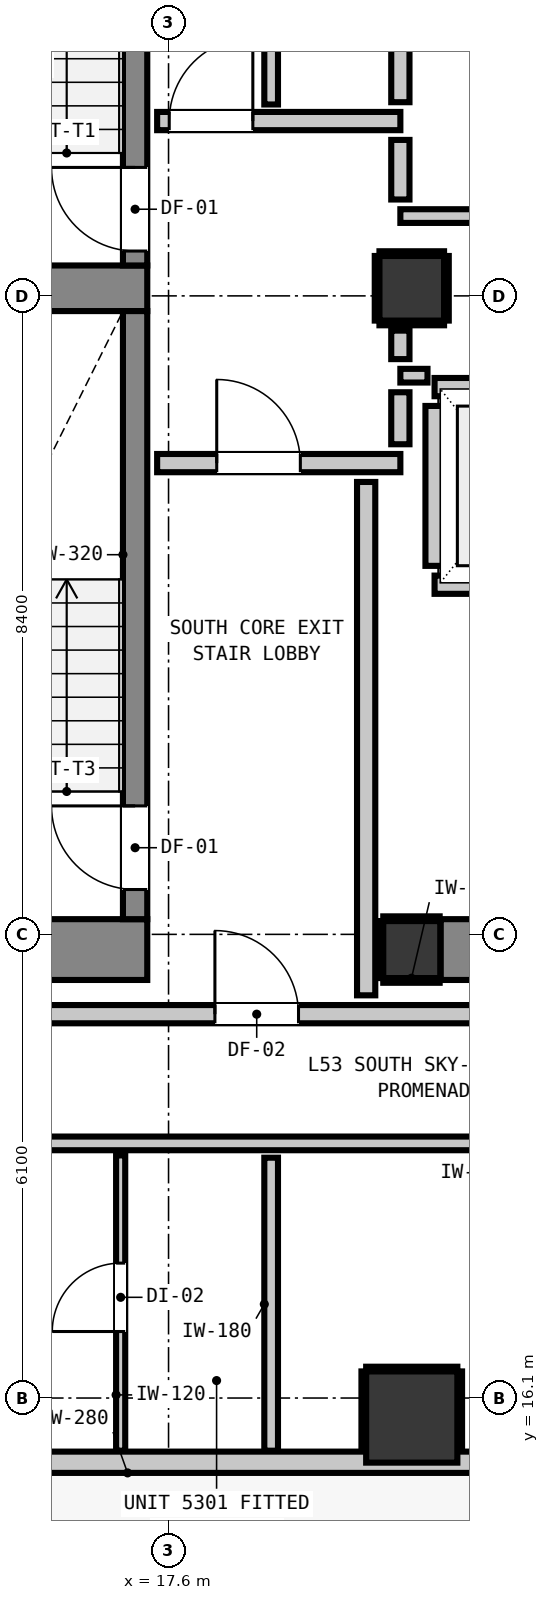
"""IFC4 building model, lengths in metres.
Left out: names, types, materials, properties, quantities, classifications, styles, units other than length and angle.
Written with IfcOpenShell. Run it as: python <this file> out.ifc"""

import sys

from ifc_helpers import new_model, si_unit, direction, frame, frame_2d, origin, origin_2d, place, context, subcontext, project, spatial, rectangle, extrude, element, fill, save


model = new_model("IFC4")
c1 = context("Model", 3, precision=1e-05, world=origin(), true_north=direction((0.0, 1.0)))
c2 = subcontext(c1, "Body", "Model", "MODEL_VIEW")
j1 = project(units=[si_unit("LENGTHUNIT", "METRE"), si_unit("PLANEANGLEUNIT", "RADIAN")], contexts=[c1])
p1 = place(None, origin())
s1 = spatial("IfcSite", under=j1, at=p1, CompositionType="ELEMENT")
p2 = place(p1, origin())
s2 = spatial("IfcBuilding", under=s1, at=p2, CompositionType="ELEMENT")
p3 = place(p2, frame((0.0, 0.0, 183.52)))
s3 = spatial("IfcBuildingStorey", under=s2, at=p3, CompositionType="ELEMENT", Elevation=183.52)
p4 = place(p3, frame((20.8, 22.0, 0.0), z_axis=(0.0, 0.0, 1.0), x_axis=(1.0, 0.0, 0.0)))
e1 = element("IfcColumn", 1, at=p4, inside=s3, PredefinedType="COLUMN", context=c2, shape_type="SweptSolid", body=[
    extrude(rectangle(XDim=0.75, YDim=0.75, at=origin_2d()), origin(), (0.0, 0.0, 1.0), 3.32),
])
p5 = place(p3, frame((13.24, 22.0, 0.0), z_axis=(0.0, 0.0, 1.0), x_axis=(1.0, 0.0, 0.0)))
e2 = element("IfcWall", 2, at=p5, inside=s3, PredefinedType="SHEAR", context=c2, shape_type="SweptSolid", body=[
    extrude(rectangle(XDim=4.08, YDim=0.8, at=frame_2d((2.04, 0.0))), origin(), (0.0, 0.0, 1.0), 3.32),
])
p6 = place(p3, frame((13.78, 30.7, 0.0), z_axis=(0.0, 0.0, 1.0), x_axis=(1.0, 0.0, 0.0)))
e3 = element("IfcWall", 3, at=p6, inside=s3, PredefinedType="SHEAR", context=c2, shape_type="SweptSolid", body=[
    extrude(rectangle(XDim=3.54, YDim=0.6, at=frame_2d((1.77, 0.0))), origin(), (0.0, 0.0, 1.0), 3.32),
])
p7 = place(p3, frame((21.18, 22.0, 0.0), z_axis=(0.0, 0.0, 1.0), x_axis=(1.0, 0.0, 0.0)))
e4 = element("IfcWall", 4, at=p7, inside=s3, PredefinedType="SHEAR", context=c2, shape_type="SweptSolid", body=[
    extrude(rectangle(XDim=7.64, YDim=0.8, at=frame_2d((3.82, 0.0))), origin(), (0.0, 0.0, 1.0), 3.32),
])
p8 = place(p3, frame((17.16, 31.0, 0.0), z_axis=(0.0, 0.0, 1.0), x_axis=(0.0, 1.0, 0.0)))
e5 = element("IfcWall", 5, at=p8, inside=s3, PredefinedType="SHEAR", context=c2, shape_type="SweptSolid", body=[
    extrude(rectangle(XDim=7.8, YDim=0.32, at=frame_2d((3.9, 0.0))), origin(), (0.0, 0.0, 1.0), 3.32),
])
p9 = place(p8, frame((0.19, 0.0, 0.0)))
e6 = element("IfcOpeningElement", 6, at=p9, cuts=e5, PredefinedType="OPENING", context=c2, shape_type="SweptSolid", body=[
    extrude(rectangle(XDim=1.1, YDim=2.15, at=frame_2d((0.55, 1.075))), frame((0.0, 0.17, 0.0), z_axis=(0.0, -1.0, 0.0), x_axis=(1.0, 0.0, 0.0)), (0.0, 0.0, 1.0), 0.34),
])
p10 = place(p3, frame((17.16, 22.4, 0.0), z_axis=(0.0, 0.0, 1.0), x_axis=(0.0, 1.0, 0.0)))
e7 = element("IfcWall", 7, at=p10, inside=s3, PredefinedType="SHEAR", context=c2, shape_type="SweptSolid", body=[
    extrude(rectangle(XDim=8.0, YDim=0.32, at=frame_2d((4.0, 0.0))), origin(), (0.0, 0.0, 1.0), 3.32),
])
p11 = place(p10, frame((0.39, 0.0, 0.0)))
e8 = element("IfcOpeningElement", 8, at=p11, cuts=e7, PredefinedType="OPENING", context=c2, shape_type="SweptSolid", body=[
    extrude(rectangle(XDim=1.1, YDim=2.15, at=frame_2d((0.55, 1.075))), frame((0.0, 0.17, 0.0), z_axis=(0.0, -1.0, 0.0), x_axis=(1.0, 0.0, 0.0)), (0.0, 0.0, 1.0), 0.34),
])
p12 = place(p3, frame((20.8, 30.7, 0.0), z_axis=(0.0, 0.0, 1.0), x_axis=(1.0, 0.0, 0.0)))
e9 = element("IfcColumn", 9, at=p12, inside=s3, PredefinedType="COLUMN", context=c2, shape_type="SweptSolid", body=[
    extrude(rectangle(XDim=0.85, YDim=0.85, at=origin_2d()), origin(), (0.0, 0.0, 1.0), 3.32),
])
p13 = place(p3, frame((20.8, 15.85, 0.0), z_axis=(0.0, 0.0, 1.0), x_axis=(1.0, 0.0, 0.0)))
e10 = element("IfcColumn", 10, at=p13, inside=s3, PredefinedType="COLUMN", context=c2, shape_type="SweptSolid", body=[
    extrude(rectangle(XDim=1.2, YDim=1.2, at=origin_2d()), origin(), (0.0, 0.0, 1.0), 3.32),
])
p14 = place(p3, frame((40.445, 15.255, 0.0), z_axis=(0.0, 0.0, 1.0), x_axis=(-1.0, 0.0, 0.0)))
e11 = element("IfcWall", 11, at=p14, inside=s3, PredefinedType="STANDARD", context=c2, shape_type="SweptSolid", body=[
    extrude(rectangle(XDim=35.09, YDim=0.28, at=frame_2d((17.545, 0.0))), origin(), (0.0, 0.0, 1.0), 3.08),
])
p15 = place(p14, frame((0.904, 0.0, 0.0)))
e12 = element("IfcOpeningElement", 12, at=p15, cuts=e11, PredefinedType="OPENING", context=c2, shape_type="SweptSolid", body=[
    extrude(rectangle(XDim=1.0, YDim=2.15, at=frame_2d((0.5, 1.075))), frame((0.0, 0.15, 0.0), z_axis=(0.0, -1.0, 0.0), x_axis=(1.0, 0.0, 0.0)), (0.0, 0.0, 1.0), 0.3),
])
p16 = place(p14, frame((30.798, 0.0, 0.85)))
e13 = element("IfcOpeningElement", 13, at=p16, cuts=e11, PredefinedType="OPENING", context=c2, shape_type="SweptSolid", body=[
    extrude(rectangle(XDim=1.05, YDim=1.65, at=frame_2d((0.525, 0.825))), frame((0.0, 0.15, 0.0), z_axis=(0.0, -1.0, 0.0), x_axis=(1.0, 0.0, 0.0)), (0.0, 0.0, 1.0), 0.3),
])
p17 = place(p14, frame((14.92, 0.0, 0.85)))
e14 = element("IfcOpeningElement", 14, at=p17, cuts=e11, PredefinedType="OPENING", context=c2, shape_type="SweptSolid", body=[
    extrude(rectangle(XDim=1.05, YDim=1.65, at=frame_2d((0.525, 0.825))), frame((0.0, 0.15, 0.0), z_axis=(0.0, -1.0, 0.0), x_axis=(1.0, 0.0, 0.0)), (0.0, 0.0, 1.0), 0.3),
])
for number, where, z_axis, x_axis in (
    (15, (21.1, 26.8, 0.0), (0.0, 0.0, 1.0), (1.0, 0.0, 0.0)),
    (16, (21.1, 29.4, 0.0), (0.0, 0.0, 1.0), (1.0, 0.0, 0.0)),
):
    element("IfcWall", number, at=place(p3, frame(where, z_axis=z_axis, x_axis=x_axis)), inside=s3, PredefinedType="PARTITIONING", context=c2, shape_type="SweptSolid", body=[
        extrude(rectangle(XDim=2.2, YDim=0.24, at=frame_2d((1.1, 0.0))), origin(), (0.0, 0.0, 1.0), 3.08),
    ])
p18 = place(p3, frame((21.1, 27.048, 0.0), z_axis=(0.0, 0.0, 1.0), x_axis=(0.0, 1.0, 0.0)))
e17 = element("IfcWall", 17, at=p18, inside=s3, PredefinedType="PARTITIONING", context=c2, shape_type="SweptSolid", body=[
    extrude(rectangle(XDim=2.104, YDim=0.24, at=frame_2d((1.052, 0.0))), origin(), (0.0, 0.0, 1.0), 2.315),
])
p19 = place(p3, frame((12.983, 21.15, 0.0), z_axis=(0.0, 0.0, 1.0), x_axis=(1.0, 0.0, 0.0)))
e18 = element("IfcWall", 18, at=p19, inside=s3, PredefinedType="PARTITIONING", context=c2, shape_type="SweptSolid", body=[
    extrude(rectangle(XDim=29.61, YDim=0.24, at=frame_2d((14.805, 0.0))), origin(), (0.0, 0.0, 1.0), 3.08),
])
p20 = place(p19, frame((5.227, 0.0, 0.0)))
e19 = element("IfcOpeningElement", 19, at=p20, cuts=e18, PredefinedType="OPENING", context=c2, shape_type="SweptSolid", body=[
    extrude(rectangle(XDim=1.1, YDim=2.15, at=frame_2d((0.55, 1.075))), frame((0.0, 0.13, 0.0), z_axis=(0.0, -1.0, 0.0), x_axis=(1.0, 0.0, 0.0)), (0.0, 0.0, 1.0), 0.26),
])
p21 = place(p19, frame((26.668, 0.0, 0.0)))
e20 = element("IfcOpeningElement", 20, at=p21, cuts=e18, PredefinedType="OPENING", context=c2, shape_type="SweptSolid", body=[
    extrude(rectangle(XDim=1.0, YDim=2.15, at=frame_2d((0.5, 1.075))), frame((0.0, 0.13, 0.0), z_axis=(0.0, -1.0, 0.0), x_axis=(1.0, 0.0, 0.0)), (0.0, 0.0, 1.0), 0.26),
])
p22 = place(p3, frame((17.45, 28.4, 0.0), z_axis=(0.0, 0.0, 1.0), x_axis=(1.0, 0.0, 0.0)))
e21 = element("IfcWall", 21, at=p22, inside=s3, PredefinedType="PARTITIONING", context=c2, shape_type="SweptSolid", body=[
    extrude(rectangle(XDim=3.2, YDim=0.24, at=frame_2d((1.6, 0.0))), origin(), (0.0, 0.0, 1.0), 3.08),
])
p23 = place(p22, frame((0.784, 0.0, 0.0)))
e22 = element("IfcOpeningElement", 22, at=p23, cuts=e21, PredefinedType="OPENING", context=c2, shape_type="SweptSolid", body=[
    extrude(rectangle(XDim=1.1, YDim=2.15, at=frame_2d((0.55, 1.075))), frame((0.0, 0.13, 0.0), z_axis=(0.0, -1.0, 0.0), x_axis=(1.0, 0.0, 0.0)), (0.0, 0.0, 1.0), 0.26),
])
p24 = place(p3, frame((17.45, 32.9, 0.0), z_axis=(0.0, 0.0, 1.0), x_axis=(1.0, 0.0, 0.0)))
e23 = element("IfcWall", 23, at=p24, inside=s3, PredefinedType="PARTITIONING", context=c2, shape_type="SweptSolid", body=[
    extrude(rectangle(XDim=3.2, YDim=0.24, at=frame_2d((1.6, 0.0))), origin(), (0.0, 0.0, 1.0), 3.08),
])
p25 = place(p24, frame((0.159, 0.0, 0.0)))
e24 = element("IfcOpeningElement", 24, at=p25, cuts=e23, PredefinedType="OPENING", context=c2, shape_type="SweptSolid", body=[
    extrude(rectangle(XDim=1.1, YDim=2.15, at=frame_2d((0.55, 1.075))), frame((0.0, 0.13, 0.0), z_axis=(0.0, -1.0, 0.0), x_axis=(1.0, 0.0, 0.0)), (0.0, 0.0, 1.0), 0.26),
])
p26 = place(p3, frame((12.983, 19.45, 0.0), z_axis=(0.0, 0.0, 1.0), x_axis=(1.0, 0.0, 0.0)))
e25 = element("IfcWall", 25, at=p26, inside=s3, PredefinedType="PARTITIONING", context=c2, shape_type="SweptSolid", body=[
    extrude(rectangle(XDim=29.61, YDim=0.18, at=frame_2d((14.805, 0.0))), origin(), (0.0, 0.0, 1.0), 3.08),
])
p27 = place(p26, frame((17.403, 0.0, 0.0)))
e26 = element("IfcOpeningElement", 26, at=p27, cuts=e25, PredefinedType="OPENING", context=c2, shape_type="SweptSolid", body=[
    extrude(rectangle(XDim=0.9, YDim=2.1, at=frame_2d((0.45, 1.05))), frame((0.0, 0.1, 0.0), z_axis=(0.0, -1.0, 0.0), x_axis=(1.0, 0.0, 0.0)), (0.0, 0.0, 1.0), 0.2),
])
p28 = place(p3, frame((20.65, 29.55, 0.0), z_axis=(0.0, 0.0, 1.0), x_axis=(1.0, 0.0, 0.0)))
e27 = element("IfcWall", 27, at=p28, inside=s3, PredefinedType="PARTITIONING", context=c2, shape_type="SweptSolid", body=[
    extrude(rectangle(XDim=0.357, YDim=0.18, at=frame_2d((0.179, 0.0))), origin(), (0.0, 0.0, 1.0), 3.08),
])
p29 = place(p3, frame((20.65, 31.65, 0.0), z_axis=(0.0, 0.0, 1.0), x_axis=(1.0, 0.0, 0.0)))
e28 = element("IfcWall", 28, at=p29, inside=s3, PredefinedType="PARTITIONING", context=c2, shape_type="SweptSolid", body=[
    extrude(rectangle(XDim=7.7, YDim=0.18, at=frame_2d((3.85, 0.0))), origin(), (0.0, 0.0, 1.0), 3.08),
])
p30 = place(p29, frame((1.924, 0.0, 0.0)))
e29 = element("IfcOpeningElement", 29, at=p30, cuts=e28, PredefinedType="OPENING", context=c2, shape_type="SweptSolid", body=[
    extrude(rectangle(XDim=0.9, YDim=2.1, at=frame_2d((0.45, 1.05))), frame((0.0, 0.1, 0.0), z_axis=(0.0, -1.0, 0.0), x_axis=(1.0, 0.0, 0.0)), (0.0, 0.0, 1.0), 0.2),
])
p31 = place(p3, frame((20.2, 21.398, 0.0), z_axis=(0.0, 0.0, 1.0), x_axis=(0.0, 1.0, 0.0)))
e30 = element("IfcWall", 30, at=p31, inside=s3, PredefinedType="PARTITIONING", context=c2, shape_type="SweptSolid", body=[
    extrude(rectangle(XDim=6.754, YDim=0.24, at=frame_2d((3.377, 0.0))), origin(), (0.0, 0.0, 1.0), 3.08),
])
p32 = place(p3, frame((20.65, 28.648, 0.0), z_axis=(0.0, 0.0, 1.0), x_axis=(0.0, 1.0, 0.0)))
e31 = element("IfcWall", 31, at=p32, inside=s3, PredefinedType="PARTITIONING", context=c2, shape_type="SweptSolid", body=[
    extrude(rectangle(XDim=0.684, YDim=0.24, at=frame_2d((0.342, 0.0))), origin(), (0.0, 0.0, 1.0), 2.315),
])
p33 = place(p3, frame((20.65, 29.768, 0.0), z_axis=(0.0, 0.0, 1.0), x_axis=(0.0, 1.0, 0.0)))
e32 = element("IfcWall", 32, at=p33, inside=s3, PredefinedType="PARTITIONING", context=c2, shape_type="SweptSolid", body=[
    extrude(rectangle(XDim=0.375, YDim=0.24, at=frame_2d((0.188, 0.0))), origin(), (0.0, 0.0, 1.0), 2.315),
])
p34 = place(p3, frame((20.65, 31.868, 0.0), z_axis=(0.0, 0.0, 1.0), x_axis=(0.0, 1.0, 0.0)))
e33 = element("IfcWall", 33, at=p34, inside=s3, PredefinedType="PARTITIONING", context=c2, shape_type="SweptSolid", body=[
    extrude(rectangle(XDim=0.784, YDim=0.24, at=frame_2d((0.392, 0.0))), origin(), (0.0, 0.0, 1.0), 2.315),
])
p35 = place(p3, frame((20.65, 33.148, 0.0), z_axis=(0.0, 0.0, 1.0), x_axis=(0.0, 1.0, 0.0)))
e34 = element("IfcWall", 34, at=p35, inside=s3, PredefinedType="PARTITIONING", context=c2, shape_type="SweptSolid", body=[
    extrude(rectangle(XDim=2.284, YDim=0.24, at=frame_2d((1.142, 0.0))), origin(), (0.0, 0.0, 1.0), 2.315),
])
p36 = place(p3, frame((18.95, 15.407, 0.0), z_axis=(0.0, 0.0, 1.0), x_axis=(0.0, 1.0, 0.0)))
e35 = element("IfcWall", 35, at=p36, inside=s3, PredefinedType="PARTITIONING", context=c2, shape_type="SweptSolid", body=[
    extrude(rectangle(XDim=3.855, YDim=0.18, at=frame_2d((1.927, 0.0))), origin(), (0.0, 0.0, 1.0), 3.08),
])
p37 = place(p3, frame((18.95, 33.118, 0.0), z_axis=(0.0, 0.0, 1.0), x_axis=(0.0, 1.0, 0.0)))
e36 = element("IfcWall", 36, at=p37, inside=s3, PredefinedType="PARTITIONING", context=c2, shape_type="SweptSolid", body=[
    extrude(rectangle(XDim=2.344, YDim=0.18, at=frame_2d((1.172, 0.0))), origin(), (0.0, 0.0, 1.0), 3.08),
])
p38 = place(p3, frame((16.97, 15.407, 0.0), z_axis=(0.0, 0.0, 1.0), x_axis=(0.0, 1.0, 0.0)))
e37 = element("IfcWall", 37, at=p38, inside=s3, PredefinedType="PARTITIONING", context=c2, shape_type="SweptSolid", body=[
    extrude(rectangle(XDim=3.885, YDim=0.12, at=frame_2d((1.942, 0.0))), origin(), (0.0, 0.0, 1.0), 3.08),
])
p39 = place(p38, frame((1.568, 0.0, 0.0)))
e38 = element("IfcOpeningElement", 38, at=p39, cuts=e37, PredefinedType="OPENING", context=c2, shape_type="SweptSolid", body=[
    extrude(rectangle(XDim=0.9, YDim=2.1, at=frame_2d((0.45, 1.05))), frame((0.0, 0.07, 0.0), z_axis=(0.0, -1.0, 0.0), x_axis=(1.0, 0.0, 0.0)), (0.0, 0.0, 1.0), 0.14),
])
for number, where, z_axis, x_axis in (
    (39, (20.425, 21.593, 0.0), (0.0, 0.0, 1.0), (1.0, 0.0, 0.0)),
    (40, (20.425, 22.407, 0.0), (0.0, 0.0, 1.0), (1.0, 0.0, 0.0)),
):
    element("IfcWall", number, at=place(p3, frame(where, z_axis=z_axis, x_axis=x_axis)), inside=s3, PredefinedType="PARTITIONING", context=c2, shape_type="SweptSolid", body=[
        extrude(rectangle(XDim=0.742, YDim=0.06, at=frame_2d((0.371, 0.0))), origin(), (0.0, 0.0, 1.0), 1.45),
    ])
p40 = place(p3, frame((20.393, 21.625, 0.0), z_axis=(0.0, 0.0, 1.0), x_axis=(0.0, 1.0, 0.0)))
e41 = element("IfcWall", 41, at=p40, inside=s3, PredefinedType="PARTITIONING", context=c2, shape_type="SweptSolid", body=[
    extrude(rectangle(XDim=0.75, YDim=0.06, at=frame_2d((0.375, 0.0))), origin(), (0.0, 0.0, 1.0), 1.45),
])
for number, where, z_axis, x_axis in (
    (42, (20.375, 30.243, 0.0), (0.0, 0.0, 1.0), (1.0, 0.0, 0.0)),
    (43, (20.375, 31.157, 0.0), (0.0, 0.0, 1.0), (1.0, 0.0, 0.0)),
    (44, (20.343, 30.275, 0.0), (0.0, 0.0, 1.0), (0.0, 1.0, 0.0)),
    (45, (21.257, 30.275, 0.0), (0.0, 0.0, 1.0), (0.0, 1.0, 0.0)),
):
    element("IfcWall", number, at=place(p3, frame(where, z_axis=z_axis, x_axis=x_axis)), inside=s3, PredefinedType="PARTITIONING", context=c2, shape_type="SweptSolid", body=[
        extrude(rectangle(XDim=0.85, YDim=0.06, at=frame_2d((0.425, 0.0))), origin(), (0.0, 0.0, 1.0), 1.45),
    ])
p41 = place(p3, frame((20.2, 16.482, 0.0), z_axis=(0.0, 0.0, 1.0), x_axis=(1.0, 0.0, 0.0)))
e46 = element("IfcWall", 46, at=p41, inside=s3, PredefinedType="PARTITIONING", context=c2, shape_type="SweptSolid", body=[
    extrude(rectangle(XDim=1.2, YDim=0.06, at=frame_2d((0.6, 0.0))), origin(), (0.0, 0.0, 1.0), 1.45),
])
for number, where, z_axis, x_axis in (
    (47, (20.168, 15.41, 0.0), (0.0, 0.0, 1.0), (0.0, 1.0, 0.0)),
    (48, (21.432, 15.41, 0.0), (0.0, 0.0, 1.0), (0.0, 1.0, 0.0)),
):
    element("IfcWall", number, at=place(p3, frame(where, z_axis=z_axis, x_axis=x_axis)), inside=s3, PredefinedType="PARTITIONING", context=c2, shape_type="SweptSolid", body=[
        extrude(rectangle(XDim=1.04, YDim=0.06, at=frame_2d((0.52, 0.0))), origin(), (0.0, 0.0, 1.0), 1.45),
    ])
p42 = place(p9, origin())
e49 = element("IfcDoor", 49, at=p42, inside=s3, OperationType="SINGLE_SWING_RIGHT", PredefinedType="DOOR", context=c2, shape_type="SweptSolid", body=[
    extrude(rectangle(XDim=1.1, YDim=2.15, at=frame_2d((0.55, 1.075))), frame((0.0, 0.025, 0.0), z_axis=(0.0, -1.0, 0.0), x_axis=(1.0, 0.0, 0.0)), (0.0, 0.0, 1.0), 0.05),
])
fill(e6, e49)
p43 = place(p11, origin())
e50 = element("IfcDoor", 50, at=p43, inside=s3, OperationType="SINGLE_SWING_RIGHT", PredefinedType="DOOR", context=c2, shape_type="SweptSolid", body=[
    extrude(rectangle(XDim=1.1, YDim=2.15, at=frame_2d((0.55, 1.075))), frame((0.0, 0.025, 0.0), z_axis=(0.0, -1.0, 0.0), x_axis=(1.0, 0.0, 0.0)), (0.0, 0.0, 1.0), 0.05),
])
fill(e8, e50)
p44 = place(p23, origin())
e51 = element("IfcDoor", 51, at=p44, inside=s3, OperationType="SINGLE_SWING_LEFT", PredefinedType="DOOR", context=c2, shape_type="SweptSolid", body=[
    extrude(rectangle(XDim=1.1, YDim=2.15, at=frame_2d((0.55, 1.075))), frame((0.0, 0.025, 0.0), z_axis=(0.0, -1.0, 0.0), x_axis=(1.0, 0.0, 0.0)), (0.0, 0.0, 1.0), 0.05),
])
fill(e22, e51)
p45 = place(p25, origin())
e52 = element("IfcDoor", 52, at=p45, inside=s3, OperationType="SINGLE_SWING_RIGHT", PredefinedType="DOOR", context=c2, shape_type="SweptSolid", body=[
    extrude(rectangle(XDim=1.1, YDim=2.15, at=frame_2d((0.55, 1.075))), frame((0.0, 0.025, 0.0), z_axis=(0.0, -1.0, 0.0), x_axis=(1.0, 0.0, 0.0)), (0.0, 0.0, 1.0), 0.05),
])
fill(e24, e52)
p46 = place(p20, origin())
e53 = element("IfcDoor", 53, at=p46, inside=s3, OperationType="SINGLE_SWING_LEFT", PredefinedType="DOOR", context=c2, shape_type="SweptSolid", body=[
    extrude(rectangle(XDim=1.1, YDim=2.15, at=frame_2d((0.55, 1.075))), frame((0.0, 0.025, 0.0), z_axis=(0.0, -1.0, 0.0), x_axis=(1.0, 0.0, 0.0)), (0.0, 0.0, 1.0), 0.05),
])
fill(e19, e53)
p47 = place(p39, origin())
e54 = element("IfcDoor", 54, at=p47, inside=s3, OperationType="SINGLE_SWING_LEFT", PredefinedType="DOOR", context=c2, shape_type="SweptSolid", body=[
    extrude(rectangle(XDim=0.9, YDim=2.1, at=frame_2d((0.45, 1.05))), frame((0.0, 0.025, 0.0), z_axis=(0.0, -1.0, 0.0), x_axis=(1.0, 0.0, 0.0)), (0.0, 0.0, 1.0), 0.05),
])
fill(e38, e54)
save(model, sys.argv[1])
